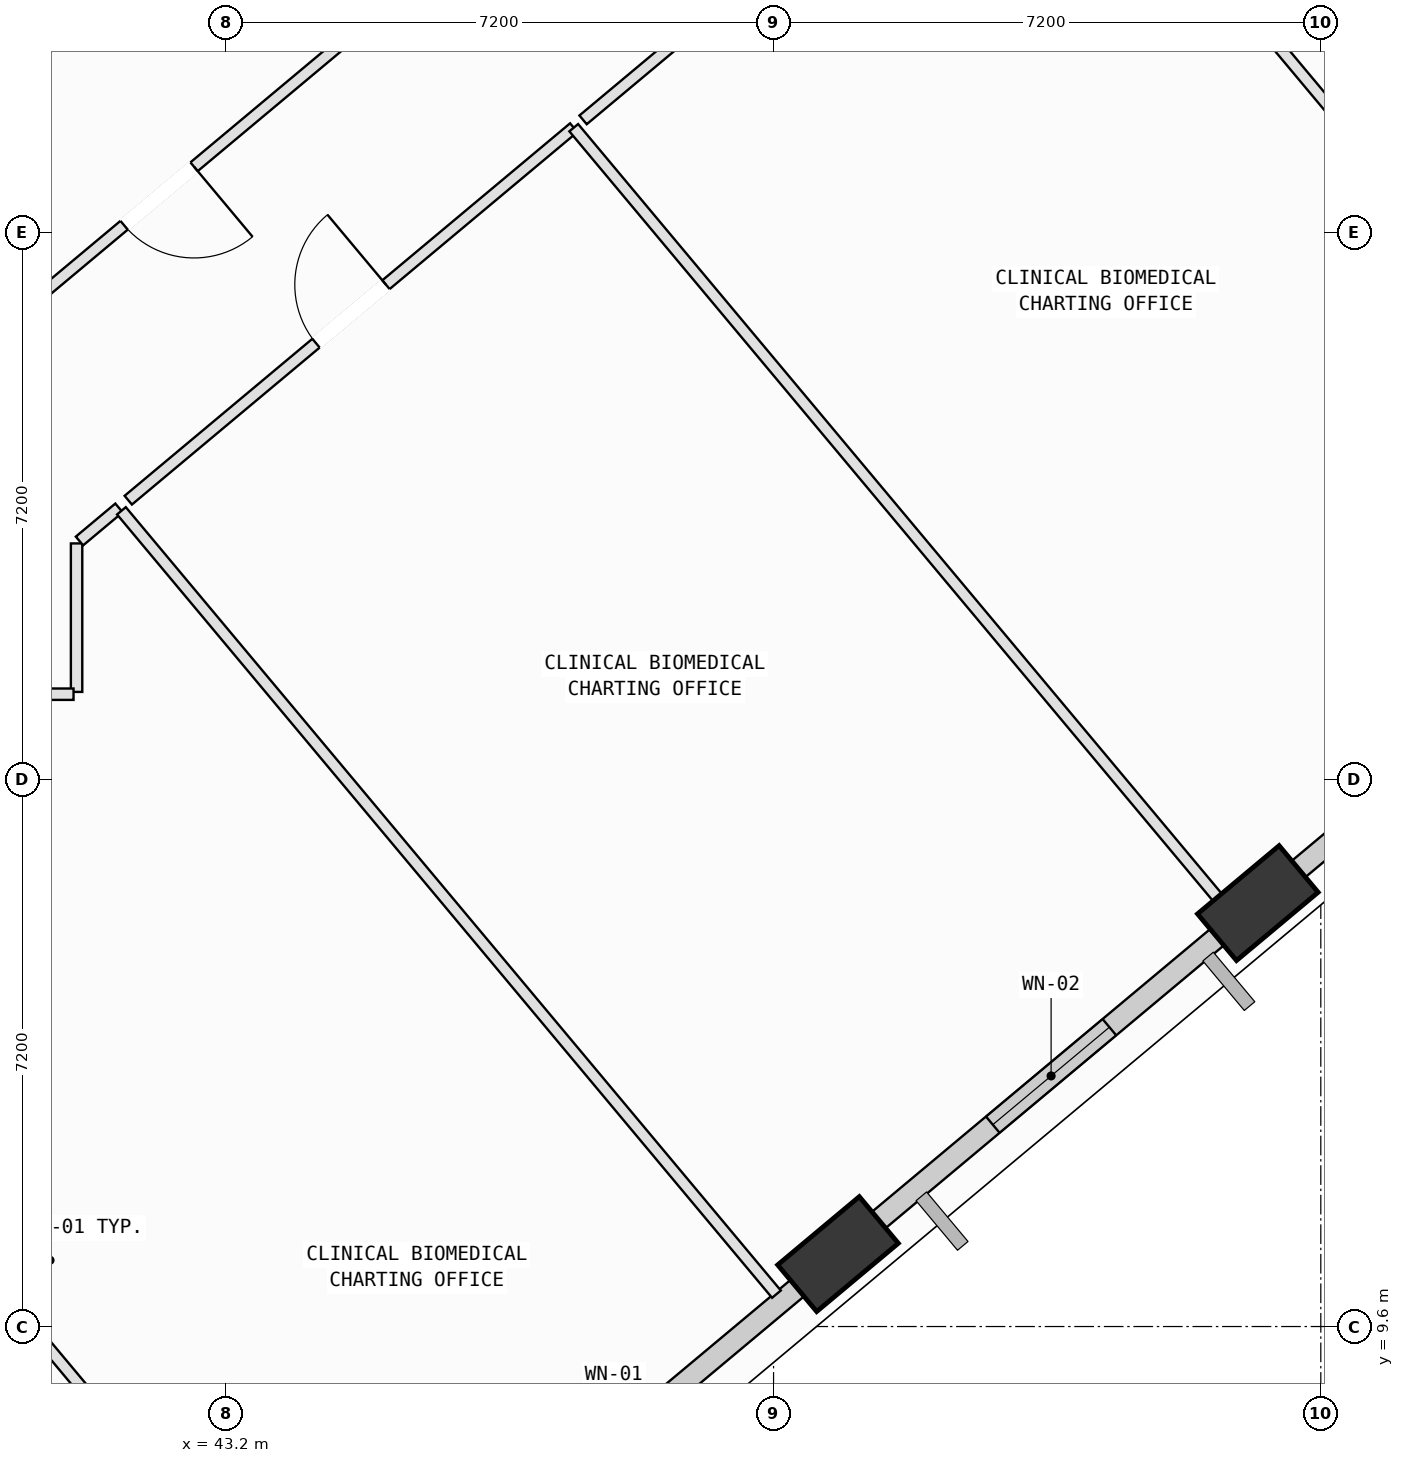
"""IFC4 building model, lengths in metres.
Left out: names, types, materials, properties, quantities, classifications, styles, units other than length and angle.
Written with IfcOpenShell. Run it as: python <this file> out.ifc"""

import sys

from ifc_helpers import new_model, si_unit, direction, frame, frame_2d, origin, origin_2d, place, context, subcontext, project, spatial, rectangle, extrude, element, fill, save


model = new_model("IFC4")
c1 = context("Model", 3, precision=1e-05, world=origin(), true_north=direction((0.0, 1.0)))
c2 = subcontext(c1, "Body", "Model", "MODEL_VIEW")
j1 = project(units=[si_unit("LENGTHUNIT", "METRE"), si_unit("PLANEANGLEUNIT", "RADIAN")], contexts=[c1])
p1 = place(None, origin())
s1 = spatial("IfcSite", under=j1, at=p1, CompositionType="ELEMENT")
p2 = place(p1, origin())
s2 = spatial("IfcBuilding", under=s1, at=p2, CompositionType="ELEMENT")
p3 = place(p2, frame((0.0, 0.0, 193.8)))
s3 = spatial("IfcBuildingStorey", under=s2, at=p3, CompositionType="ELEMENT", Elevation=193.8)
p4 = place(p3, frame((51.248, 10.553, 0.002), z_axis=(0.058207280613, 0.073352121651, 0.995606035906), x_axis=(-0.99792031094, -0.023390957451, 0.060065931471)))
e1 = element("IfcColumn", 1, at=p4, inside=s3, PredefinedType="COLUMN", context=c2, shape_type="SweptSolid", body=[
    extrude(rectangle(XDim=1.4, YDim=0.8, at=origin_2d()), origin(), (0.0, 0.0, 1.0), 4.014),
])
p5 = place(p3, frame((56.771, 15.172, 0.002), z_axis=(0.038888663532, 0.095824097484, 0.994638333361), x_axis=(-0.950777266838, -0.302691625146, 0.066335276659)))
e2 = element("IfcColumn", 2, at=p5, inside=s3, PredefinedType="COLUMN", context=c2, shape_type="SweptSolid", body=[
    extrude(rectangle(XDim=1.4, YDim=0.8, at=origin_2d()), origin(), (0.0, 0.0, 1.0), 4.018),
])
p6 = place(p3, frame((51.01, 10.354, 0.0), z_axis=(0.0, 0.0, 1.0), x_axis=(-0.767179241659, -0.641432779929, 0.0)))
e3 = element("IfcWall", 3, at=p6, inside=s3, PredefinedType="SOLIDWALL", context=c2, shape_type="SweptSolid", body=[
    extrude(rectangle(XDim=6.209, YDim=0.28, at=frame_2d((3.104, 0.0))), origin(), (0.0, 0.0, 1.0), 3.265),
])
p7 = place(p6, frame((2.734, 0.0, 0.75)))
e4 = element("IfcOpeningElement", 4, at=p7, cuts=e3, PredefinedType="OPENING", context=c2, shape_type="SweptSolid", body=[
    extrude(rectangle(XDim=1.6, YDim=1.95, at=frame_2d((0.8, 0.975))), frame((0.0, 0.15, 0.0), z_axis=(0.0, -1.0, 0.0), x_axis=(1.0, 0.0, 0.0)), (0.0, 0.0, 1.0), 0.3),
])
p8 = place(p3, frame((56.539, 14.977, 0.0), z_axis=(0.0, 0.0, 1.0), x_axis=(-0.767164687181, -0.641450187265, 0.0)))
e5 = element("IfcWall", 5, at=p8, inside=s3, PredefinedType="SOLIDWALL", context=c2, shape_type="SweptSolid", body=[
    extrude(rectangle(XDim=6.218, YDim=0.28, at=frame_2d((3.109, 0.0))), origin(), (0.0, 0.0, 1.0), 3.265),
])
p9 = place(p8, frame((2.242, 0.0, 0.75)))
e6 = element("IfcOpeningElement", 6, at=p9, cuts=e5, PredefinedType="OPENING", context=c2, shape_type="SweptSolid", body=[
    extrude(rectangle(XDim=2.0, YDim=1.95, at=frame_2d((1.0, 0.975))), frame((0.0, 0.15, 0.0), z_axis=(0.0, -1.0, 0.0), x_axis=(1.0, 0.0, 0.0)), (0.0, 0.0, 1.0), 0.3),
])
p10 = place(p3, frame((62.074, 19.605, 0.0), z_axis=(0.0, 0.0, 1.0), x_axis=(-0.76717519445, -0.641437620522, 0.0)))
e7 = element("IfcWall", 7, at=p10, inside=s3, PredefinedType="SOLIDWALL", context=c2, shape_type="SweptSolid", body=[
    extrude(rectangle(XDim=6.242, YDim=0.28, at=frame_2d((3.121, 0.0))), origin(), (0.0, 0.0, 1.0), 3.265),
])
p11 = place(p10, frame((0.968, 0.0, 0.75)))
e8 = element("IfcOpeningElement", 8, at=p11, cuts=e7, PredefinedType="OPENING", context=c2, shape_type="SweptSolid", body=[
    extrude(rectangle(XDim=1.4, YDim=1.85, at=frame_2d((0.7, 0.925))), frame((0.0, 0.15, 0.0), z_axis=(0.0, -1.0, 0.0), x_axis=(1.0, 0.0, 0.0)), (0.0, 0.0, 1.0), 0.3),
])
p12 = place(p3, frame((36.15, 14.953, 0.0), z_axis=(0.0, 0.0, 1.0), x_axis=(0.641424642923, -0.767186044875, 0.0)))
e9 = element("IfcWall", 9, at=p12, inside=s3, PredefinedType="PARTITIONING", context=c2, shape_type="SweptSolid", body=[
    extrude(rectangle(XDim=12.945, YDim=0.15, at=frame_2d((6.472, 0.0))), origin(), (0.0, 0.0, 1.0), 3.78),
])
p13 = place(p12, frame((6.042, 0.0, 0.0)))
e10 = element("IfcOpeningElement", 10, at=p13, cuts=e9, PredefinedType="OPENING", context=c2, shape_type="SweptSolid", body=[
    extrude(rectangle(XDim=0.86, YDim=2.06, at=frame_2d((0.43, 1.03))), frame((0.0, 0.085, 0.0), z_axis=(0.0, -1.0, 0.0), x_axis=(1.0, 0.0, 0.0)), (0.0, 0.0, 1.0), 0.17),
])
p14 = place(p3, frame((41.23, 17.95, 0.0), z_axis=(0.0, 0.0, 1.0), x_axis=(0.0, 1.0, 0.0)))
e11 = element("IfcWall", 11, at=p14, inside=s3, PredefinedType="PARTITIONING", context=c2, shape_type="SweptSolid", body=[
    extrude(rectangle(XDim=1.954, YDim=0.15, at=frame_2d((0.977, 0.0))), origin(), (0.0, 0.0, 1.0), 3.78),
])
p15 = place(p3, frame((41.268, 19.936, 0.0), z_axis=(0.0, 0.0, 1.0), x_axis=(0.766980203841, 0.641670762086, 0.0)))
e12 = element("IfcWall", 12, at=p15, inside=s3, PredefinedType="PARTITIONING", context=c2, shape_type="SweptSolid", body=[
    extrude(rectangle(XDim=0.678, YDim=0.15, at=frame_2d((0.339, 0.0))), origin(), (0.0, 0.0, 1.0), 3.065),
])
p16 = place(p3, frame((41.82, 20.333, 0.0), z_axis=(0.0, 0.0, 1.0), x_axis=(0.641441854708, -0.767171654213, 0.0)))
e13 = element("IfcWall", 13, at=p16, inside=s3, PredefinedType="PARTITIONING", context=c2, shape_type="SweptSolid", body=[
    extrude(rectangle(XDim=13.435, YDim=0.15, at=frame_2d((6.718, 0.0))), origin(), (0.0, 0.0, 1.0), 3.78),
])
p17 = place(p3, frame((38.907, 17.92, 0.0), z_axis=(0.0, 0.0, 1.0), x_axis=(1.0, 0.0, 0.0)))
e14 = element("IfcWall", 14, at=p17, inside=s3, PredefinedType="PARTITIONING", context=c2, shape_type="SweptSolid", body=[
    extrude(rectangle(XDim=2.283, YDim=0.15, at=frame_2d((1.142, 0.0))), origin(), (0.0, 0.0, 1.0), 3.065),
])
p18 = place(p3, frame((41.91, 20.473, 0.0), z_axis=(0.0, 0.0, 1.0), x_axis=(0.767133193251, 0.641487851648, 0.0)))
e15 = element("IfcWall", 15, at=p18, inside=s3, PredefinedType="PARTITIONING", context=c2, shape_type="SweptSolid", body=[
    extrude(rectangle(XDim=7.64, YDim=0.15, at=frame_2d((3.82, 0.0))), origin(), (0.0, 0.0, 1.0), 3.065),
])
p19 = place(p18, frame((3.22, 0.0, 0.0)))
e16 = element("IfcOpeningElement", 16, at=p19, cuts=e15, PredefinedType="OPENING", context=c2, shape_type="SweptSolid", body=[
    extrude(rectangle(XDim=1.2, YDim=2.15, at=frame_2d((0.6, 1.075))), frame((0.0, 0.085, 0.0), z_axis=(0.0, -1.0, 0.0), x_axis=(1.0, 0.0, 0.0)), (0.0, 0.0, 1.0), 0.17),
])
p20 = place(p3, frame((47.771, 25.374, 0.0), z_axis=(0.0, 0.0, 1.0), x_axis=(0.6415100718, -0.767114611892, 0.0)))
e17 = element("IfcWall", 17, at=p20, inside=s3, PredefinedType="PARTITIONING", context=c2, shape_type="SweptSolid", body=[
    extrude(rectangle(XDim=13.486, YDim=0.15, at=frame_2d((6.743, 0.0))), origin(), (0.0, 0.0, 1.0), 3.78),
])
p21 = place(p3, frame((51.916, 10.812, 0.0), z_axis=(0.0, 0.0, 1.0), x_axis=(-0.766986359931, -0.641663403725, 0.0)))
e18 = element("IfcWall", 18, at=p21, inside=s3, PredefinedType="PARTITIONING", context=c2, shape_type="SweptSolid", body=[
    extrude(rectangle(XDim=0.99, YDim=0.15, at=frame_2d((0.495, 0.0))), origin(), (0.0, 0.0, 1.0), 3.265),
])
p22 = place(p3, frame((47.894, 25.477, 0.0), z_axis=(0.0, 0.0, 1.0), x_axis=(0.767198673316, 0.641409538176, 0.0)))
e19 = element("IfcWall", 19, at=p22, inside=s3, PredefinedType="PARTITIONING", context=c2, shape_type="SweptSolid", body=[
    extrude(rectangle(XDim=7.639, YDim=0.15, at=frame_2d((3.82, 0.0))), origin(), (0.0, 0.0, 1.0), 3.78),
])
p23 = place(p22, frame((3.22, 0.0, 0.0)))
e20 = element("IfcOpeningElement", 20, at=p23, cuts=e19, PredefinedType="OPENING", context=c2, shape_type="SweptSolid", body=[
    extrude(rectangle(XDim=1.2, YDim=2.15, at=frame_2d((0.6, 1.075))), frame((0.0, 0.085, 0.0), z_axis=(0.0, -1.0, 0.0), x_axis=(1.0, 0.0, 0.0)), (0.0, 0.0, 1.0), 0.17),
])
p24 = place(p3, frame((53.755, 30.377, 0.0), z_axis=(0.0, 0.0, 1.0), x_axis=(0.641485701033, -0.767134991621, 0.0)))
e21 = element("IfcWall", 21, at=p24, inside=s3, PredefinedType="PARTITIONING", context=c2, shape_type="SweptSolid", body=[
    extrude(rectangle(XDim=13.831, YDim=0.15, at=frame_2d((6.915, 0.0))), origin(), (0.0, 0.0, 1.0), 3.78),
])
p25 = place(p3, frame((57.433, 15.425, 0.0), z_axis=(0.0, 0.0, 1.0), x_axis=(-0.767508262314, -0.64103905285, 0.0)))
e22 = element("IfcWall", 22, at=p25, inside=s3, PredefinedType="PARTITIONING", context=c2, shape_type="SweptSolid", body=[
    extrude(rectangle(XDim=0.871, YDim=0.15, at=frame_2d((0.435, 0.0))), origin(), (0.0, 0.0, 1.0), 3.265),
])
p26 = place(p3, frame((46.469, 27.948, 0.0), z_axis=(0.0, 0.0, 1.0), x_axis=(-0.767146465677, -0.641471979279, 0.0)))
e23 = element("IfcWall", 23, at=p26, inside=s3, PredefinedType="PARTITIONING", context=c2, shape_type="SweptSolid", body=[
    extrude(rectangle(XDim=10.828, YDim=0.15, at=frame_2d((5.414, 0.0))), origin(), (0.0, 0.0, 1.0), 3.065),
])
p27 = place(p26, frame((4.814, 0.0, 0.0)))
e24 = element("IfcOpeningElement", 24, at=p27, cuts=e23, PredefinedType="OPENING", context=c2, shape_type="SweptSolid", body=[
    extrude(rectangle(XDim=1.2, YDim=2.15, at=frame_2d((0.6, 1.075))), frame((0.0, 0.085, 0.0), z_axis=(0.0, -1.0, 0.0), x_axis=(1.0, 0.0, 0.0)), (0.0, 0.0, 1.0), 0.17),
])
p28 = place(p3, frame((34.929, 24.869, 0.0), z_axis=(0.0, 0.0, 1.0), x_axis=(0.767200123668, 0.641407803385, 0.0)))
e25 = element("IfcWall", 25, at=p28, inside=s3, PredefinedType="PARTITIONING", context=c2, shape_type="SweptSolid", body=[
    extrude(rectangle(XDim=10.828, YDim=0.15, at=frame_2d((5.414, 0.0))), origin(), (0.0, 0.0, 1.0), 3.265),
])
p29 = place(p3, frame((54.999, 31.509, 0.0), z_axis=(0.0, 0.0, 1.0), x_axis=(0.641453119542, -0.767162235404, 0.0)))
e26 = element("IfcWall", 26, at=p29, inside=s3, PredefinedType="PARTITIONING", context=c2, shape_type="SweptSolid", body=[
    extrude(rectangle(XDim=11.822, YDim=0.15, at=frame_2d((5.911, 0.0))), origin(), (0.0, 0.0, 1.0), 3.78),
])
p30 = place(p29, frame((5.481, 0.0, 0.0)))
e27 = element("IfcOpeningElement", 27, at=p30, cuts=e26, PredefinedType="OPENING", context=c2, shape_type="SweptSolid", body=[
    extrude(rectangle(XDim=0.86, YDim=2.06, at=frame_2d((0.43, 1.03))), frame((0.0, 0.085, 0.0), z_axis=(0.0, -1.0, 0.0), x_axis=(1.0, 0.0, 0.0)), (0.0, 0.0, 1.0), 0.17),
])
p31 = place(p3, frame((56.902, 33.099, 0.0), z_axis=(0.0, 0.0, 1.0), x_axis=(0.641465569616, -0.767151825259, 0.0)))
e28 = element("IfcWall", 28, at=p31, inside=s3, PredefinedType="PARTITIONING", context=c2, shape_type="SweptSolid", body=[
    extrude(rectangle(XDim=11.22, YDim=0.15, at=frame_2d((5.61, 0.0))), origin(), (0.0, 0.0, 1.0), 3.265),
])
p32 = place(p9, origin())
e29 = element("IfcWindow", 29, at=p32, inside=s3, PartitioningType="SINGLE_PANEL", PredefinedType="WINDOW", context=c2, shape_type="SweptSolid", body=[
    extrude(rectangle(XDim=2.0, YDim=1.95, at=frame_2d((1.0, 0.975))), frame((0.0, 0.03, 0.0), z_axis=(0.0, -1.0, 0.0), x_axis=(1.0, 0.0, 0.0)), (0.0, 0.0, 1.0), 0.06),
])
fill(e6, e29)
p33 = place(p19, origin())
e30 = element("IfcDoor", 30, at=p33, inside=s3, OperationType="SINGLE_SWING_RIGHT", PredefinedType="DOOR", context=c2, shape_type="SweptSolid", body=[
    extrude(rectangle(XDim=1.2, YDim=2.15, at=frame_2d((0.6, 1.075))), frame((0.0, 0.025, 0.0), z_axis=(0.0, -1.0, 0.0), x_axis=(1.0, 0.0, 0.0)), (0.0, 0.0, 1.0), 0.05),
])
fill(e16, e30)
p34 = place(p27, origin())
e31 = element("IfcDoor", 31, at=p34, inside=s3, OperationType="SINGLE_SWING_LEFT", PredefinedType="DOOR", context=c2, shape_type="SweptSolid", body=[
    extrude(rectangle(XDim=1.2, YDim=2.15, at=frame_2d((0.6, 1.075))), frame((0.0, 0.025, 0.0), z_axis=(0.0, -1.0, 0.0), x_axis=(1.0, 0.0, 0.0)), (0.0, 0.0, 1.0), 0.05),
])
fill(e24, e31)
save(model, sys.argv[1])
